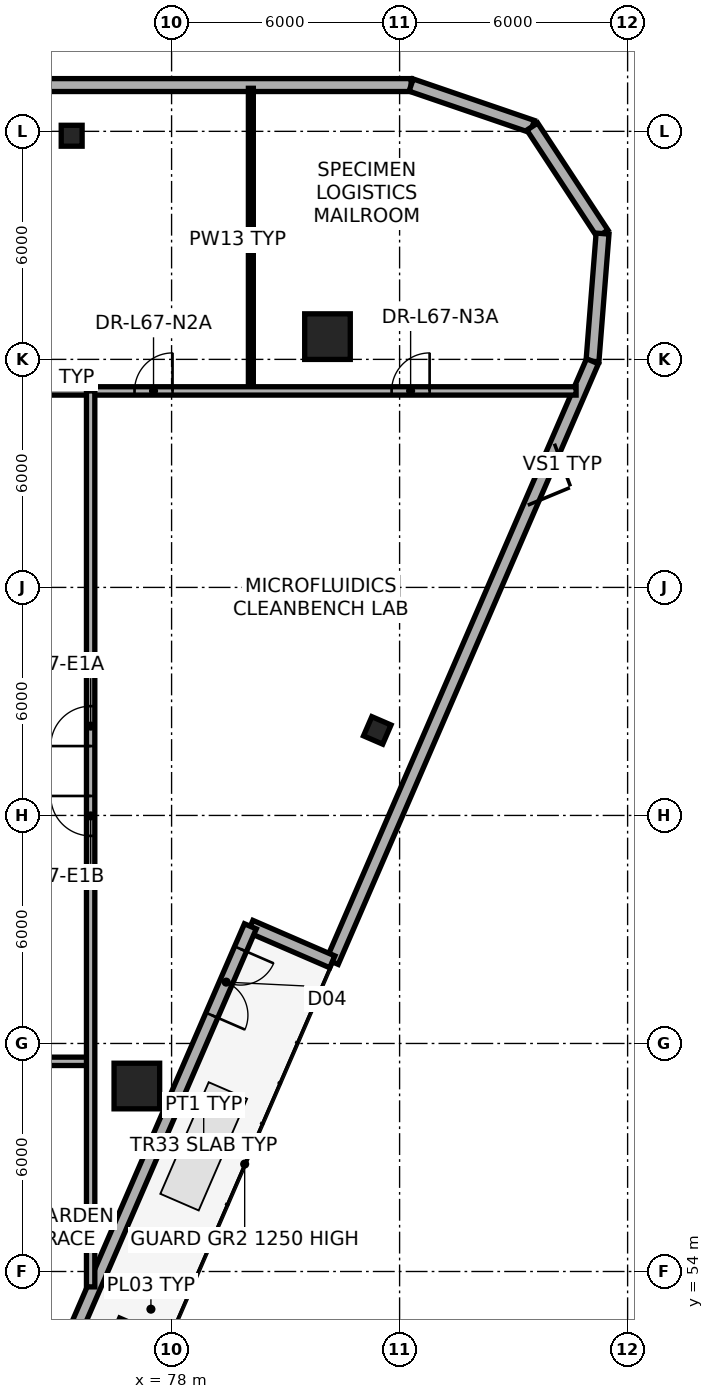
"""IFC4 building model, lengths in metres.
Left out: names, types, materials, properties, quantities, classifications, styles, units other than length and angle.
Written with IfcOpenShell. Run it as: python <this file> out.ifc"""

import sys

from ifc_helpers import new_model, si_unit, direction, frame, frame_2d, origin, origin_2d, place, context, subcontext, project, spatial, rectangle, extrude, element, fill, save


model = new_model("IFC4")
c1 = context("Model", 3, precision=1e-05, world=origin(), true_north=direction((0.0, 1.0)))
c2 = subcontext(c1, "Body", "Model", "MODEL_VIEW")
j1 = project(units=[si_unit("LENGTHUNIT", "METRE"), si_unit("PLANEANGLEUNIT", "RADIAN")], contexts=[c1])
p1 = place(None, origin())
s1 = spatial("IfcSite", under=j1, at=p1, CompositionType="ELEMENT")
p2 = place(p1, origin())
s2 = spatial("IfcBuilding", under=s1, at=p2, CompositionType="ELEMENT")
p3 = place(p2, frame((0.0, 0.0, 253.5)))
s3 = spatial("IfcBuildingStorey", under=s2, at=p3, CompositionType="ELEMENT", Elevation=253.5)
for number, where, z_axis, x_axis in (
    (1, (82.102, 78.599, 0.0), (0.0, 0.0, 1.0), (1.0, 0.0, 0.0)),
    (2, (77.086, 58.88, 0.0), (0.0, 0.0, 1.0), (1.0, 0.0, 0.0)),
):
    element("IfcColumn", number, at=place(p3, frame(where, z_axis=z_axis, x_axis=x_axis)), inside=s3, PredefinedType="COLUMN", context=c2, shape_type="SweptSolid", body=[
        extrude(rectangle(XDim=1.2, YDim=1.2, at=origin_2d()), origin(), (0.0, 0.0, 1.0), 3.65),
    ])
p4 = place(p3, frame((76.692, 52.314, 0.003), z_axis=(-0.019545044433, 0.038353802945, 0.999073058909), x_axis=(0.06214873527, -0.997284917644, 0.039500984089)))
e3 = element("IfcColumn", 3, at=p4, inside=s3, PredefinedType="PILASTER", context=c2, shape_type="SweptSolid", body=[
    extrude(rectangle(XDim=0.7, YDim=0.35, at=origin_2d()), origin(), (0.0, 0.0, 1.0), 3.647),
])
p5 = place(p3, frame((83.484, 68.248, 0.003), z_axis=(-0.039229508262, -0.005623342481, 0.999214403269), x_axis=(0.964025407479, -0.263310688432, 0.036366125617)))
e4 = element("IfcColumn", 4, at=p5, inside=s3, PredefinedType="COLUMN", context=c2, shape_type="SweptSolid", body=[
    extrude(rectangle(XDim=0.55, YDim=0.55, at=origin_2d()), origin(), (0.0, 0.0, 1.0), 3.647),
])
p6 = place(p3, frame((75.42, 83.946, 0.003), z_axis=(-0.026841076243, -0.033534611465, 0.999077067328), x_axis=(-0.780716755404, 0.624885067698, 0.0)))
e5 = element("IfcColumn", 5, at=p6, inside=s3, PredefinedType="COLUMN", context=c2, shape_type="SweptSolid", body=[
    extrude(rectangle(XDim=0.55, YDim=0.55, at=origin_2d()), origin(), (0.0, 0.0, 1.0), 3.647),
])
p7 = place(p3, frame((47.696, 85.218, 0.0), z_axis=(0.0, 0.0, 1.0), x_axis=(1.0, 0.0, 0.0)))
e6 = element("IfcWall", 6, at=p7, inside=s3, PredefinedType="STANDARD", context=c2, shape_type="SweptSolid", body=[
    extrude(rectangle(XDim=36.607, YDim=0.34, at=frame_2d((18.304, 0.0))), origin(), (0.0, 0.0, 1.0), 0.85),
])
p8 = place(p3, frame((84.304, 85.218, 0.0), z_axis=(0.0, 0.0, 1.0), x_axis=(0.946072263845, -0.323955662989, 0.0)))
e7 = element("IfcWall", 7, at=p8, inside=s3, PredefinedType="STANDARD", context=c2, shape_type="SweptSolid", body=[
    extrude(rectangle(XDim=3.369, YDim=0.34, at=frame_2d((1.685, 0.0))), origin(), (0.0, 0.0, 1.0), 3.4),
])
p9 = place(p3, frame((87.491, 84.126, 0.0), z_axis=(0.0, 0.0, 1.0), x_axis=(0.548851092281, -0.835920138831, 0.0)))
e8 = element("IfcWall", 8, at=p9, inside=s3, PredefinedType="STANDARD", context=c2, shape_type="SweptSolid", body=[
    extrude(rectangle(XDim=3.37, YDim=0.34, at=frame_2d((1.685, 0.0))), origin(), (0.0, 0.0, 1.0), 3.4),
])
p10 = place(p3, frame((89.341, 81.31, 0.0), z_axis=(0.0, 0.0, 1.0), x_axis=(-0.078835134627, -0.996887667467, 0.0)))
e9 = element("IfcWall", 9, at=p10, inside=s3, PredefinedType="STANDARD", context=c2, shape_type="SweptSolid", body=[
    extrude(rectangle(XDim=3.369, YDim=0.34, at=frame_2d((1.685, 0.0))), origin(), (0.0, 0.0, 1.0), 3.4),
])
p11 = place(p3, frame((89.075, 77.951, 0.0), z_axis=(0.0, 0.0, 1.0), x_axis=(-0.397531449249, -0.917588549873, 0.0)))
e10 = element("IfcWall", 10, at=p11, inside=s3, PredefinedType="STANDARD", context=c2, shape_type="SweptSolid", body=[
    extrude(rectangle(XDim=17.222, YDim=0.34, at=frame_2d((8.611, 0.0))), origin(), (0.0, 0.0, 1.0), 0.85),
])
p12 = place(p3, frame((82.229, 62.148, 0.0), z_axis=(0.0, 0.0, 1.0), x_axis=(-0.917563205573, 0.397589944263, 0.0)))
e11 = element("IfcWall", 11, at=p12, inside=s3, PredefinedType="STANDARD", context=c2, shape_type="SweptSolid", body=[
    extrude(rectangle(XDim=2.35, YDim=0.34, at=frame_2d((1.175, 0.0))), origin(), (0.0, 0.0, 1.0), 2.68),
])
p13 = place(p3, frame((80.073, 63.083, 0.0), z_axis=(0.0, 0.0, 1.0), x_axis=(-0.397528289892, -0.91758991861, 0.0)))
e12 = element("IfcWall", 12, at=p13, inside=s3, PredefinedType="STANDARD", context=c2, shape_type="SweptSolid", body=[
    extrude(rectangle(XDim=11.6, YDim=0.34, at=frame_2d((5.8, 0.0))), origin(), (0.0, 0.0, 1.0), 2.98),
])
p14 = place(p13, frame((0.65, 0.0, 0.0)))
e13 = element("IfcOpeningElement", 13, at=p14, cuts=e12, PredefinedType="OPENING", context=c2, shape_type="SweptSolid", body=[
    extrude(rectangle(XDim=1.9, YDim=2.3, at=frame_2d((0.95, 1.15))), frame((0.0, 0.18, 0.0), z_axis=(0.0, -1.0, 0.0), x_axis=(1.0, 0.0, 0.0)), (0.0, 0.0, 1.0), 0.36),
])
p15 = place(p3, frame((80.086, 77.17, 0.0), z_axis=(0.0, 0.0, 1.0), x_axis=(0.0, 1.0, 0.0)))
e14 = element("IfcWall", 14, at=p15, inside=s3, PredefinedType="PARTITIONING", context=c2, shape_type="SweptSolid", body=[
    extrude(rectangle(XDim=7.963, YDim=0.13, at=frame_2d((3.981, 0.0))), origin(), (0.0, 0.0, 1.0), 2.68),
])
p16 = place(p3, frame((57.55, 77.17, 0.0), z_axis=(0.0, 0.0, 1.0), x_axis=(1.0, 0.0, 0.0)))
e15 = element("IfcWall", 15, at=p16, inside=s3, PredefinedType="PARTITIONING", context=c2, shape_type="SweptSolid", body=[
    extrude(rectangle(XDim=31.094, YDim=0.22, at=frame_2d((15.547, 0.0))), origin(), (0.0, 0.0, 1.0), 2.68),
])
p17 = place(p16, frame((11.21, 0.0, 0.0)))
e16 = element("IfcOpeningElement", 16, at=p17, cuts=e15, PredefinedType="OPENING", context=c2, shape_type="SweptSolid", body=[
    extrude(rectangle(XDim=0.98, YDim=2.1, at=frame_2d((0.49, 1.05))), frame((0.0, 0.12, 0.0), z_axis=(0.0, -1.0, 0.0), x_axis=(1.0, 0.0, 0.0)), (0.0, 0.0, 1.0), 0.24),
])
p18 = place(p16, frame((14.035, 0.0, 0.0)))
e17 = element("IfcOpeningElement", 17, at=p18, cuts=e15, PredefinedType="OPENING", context=c2, shape_type="SweptSolid", body=[
    extrude(rectangle(XDim=0.98, YDim=2.1, at=frame_2d((0.49, 1.05))), frame((0.0, 0.12, 0.0), z_axis=(0.0, -1.0, 0.0), x_axis=(1.0, 0.0, 0.0)), (0.0, 0.0, 1.0), 0.24),
])
p19 = place(p16, frame((2.931, 0.0, 0.0)))
e18 = element("IfcOpeningElement", 18, at=p19, cuts=e15, PredefinedType="OPENING", context=c2, shape_type="SweptSolid", body=[
    extrude(rectangle(XDim=1.0, YDim=2.1, at=frame_2d((0.5, 1.05))), frame((0.0, 0.12, 0.0), z_axis=(0.0, -1.0, 0.0), x_axis=(1.0, 0.0, 0.0)), (0.0, 0.0, 1.0), 0.24),
])
p20 = place(p16, frame((19.475, 0.0, 0.0)))
e19 = element("IfcOpeningElement", 19, at=p20, cuts=e15, PredefinedType="OPENING", context=c2, shape_type="SweptSolid", body=[
    extrude(rectangle(XDim=1.0, YDim=2.1, at=frame_2d((0.5, 1.05))), frame((0.0, 0.12, 0.0), z_axis=(0.0, -1.0, 0.0), x_axis=(1.0, 0.0, 0.0)), (0.0, 0.0, 1.0), 0.24),
])
p21 = place(p16, frame((26.24, 0.0, 0.0)))
e20 = element("IfcOpeningElement", 20, at=p21, cuts=e15, PredefinedType="OPENING", context=c2, shape_type="SweptSolid", body=[
    extrude(rectangle(XDim=1.0, YDim=2.1, at=frame_2d((0.5, 1.05))), frame((0.0, 0.12, 0.0), z_axis=(0.0, -1.0, 0.0), x_axis=(1.0, 0.0, 0.0)), (0.0, 0.0, 1.0), 0.24),
])
p22 = place(p3, frame((50.998, 59.53, 0.0), z_axis=(0.0, 0.0, 1.0), x_axis=(1.0, 0.0, 0.0)))
e21 = element("IfcWall", 21, at=p22, inside=s3, PredefinedType="PARTITIONING", context=c2, shape_type="SweptSolid", body=[
    extrude(rectangle(XDim=24.872, YDim=0.22, at=frame_2d((12.436, 0.0))), origin(), (0.0, 0.0, 1.0), 2.68),
])
p23 = place(p22, frame((7.099, 0.0, 0.0)))
e22 = element("IfcOpeningElement", 22, at=p23, cuts=e21, PredefinedType="OPENING", context=c2, shape_type="SweptSolid", body=[
    extrude(rectangle(XDim=1.5, YDim=2.2, at=frame_2d((0.75, 1.1))), frame((0.0, 0.12, 0.0), z_axis=(0.0, -1.0, 0.0), x_axis=(1.0, 0.0, 0.0)), (0.0, 0.0, 1.0), 0.24),
])
p24 = place(p22, frame((17.844, 0.0, 0.0)))
e23 = element("IfcOpeningElement", 23, at=p24, cuts=e21, PredefinedType="OPENING", context=c2, shape_type="SweptSolid", body=[
    extrude(rectangle(XDim=1.5, YDim=2.2, at=frame_2d((0.75, 1.1))), frame((0.0, 0.12, 0.0), z_axis=(0.0, -1.0, 0.0), x_axis=(1.0, 0.0, 0.0)), (0.0, 0.0, 1.0), 0.24),
])
p25 = place(p3, frame((75.87, 53.595, 0.0), z_axis=(0.0, 0.0, 1.0), x_axis=(0.0, 1.0, 0.0)))
e24 = element("IfcWall", 24, at=p25, inside=s3, PredefinedType="PARTITIONING", context=c2, shape_type="SweptSolid", body=[
    extrude(rectangle(XDim=23.574, YDim=0.22, at=frame_2d((11.787, 0.0))), origin(), (0.0, 0.0, 1.0), 2.83),
])
p26 = place(p25, frame((14.23, 0.0, 0.0)))
e25 = element("IfcOpeningElement", 25, at=p26, cuts=e24, PredefinedType="OPENING", context=c2, shape_type="SweptSolid", body=[
    extrude(rectangle(XDim=1.05, YDim=2.15, at=frame_2d((0.525, 1.075))), frame((0.0, 0.12, 0.0), z_axis=(0.0, -1.0, 0.0), x_axis=(1.0, 0.0, 0.0)), (0.0, 0.0, 1.0), 0.24),
])
p27 = place(p25, frame((11.867, 0.0, 0.0)))
e26 = element("IfcOpeningElement", 26, at=p27, cuts=e24, PredefinedType="OPENING", context=c2, shape_type="SweptSolid", body=[
    extrude(rectangle(XDim=1.05, YDim=2.15, at=frame_2d((0.525, 1.075))), frame((0.0, 0.12, 0.0), z_axis=(0.0, -1.0, 0.0), x_axis=(1.0, 0.0, 0.0)), (0.0, 0.0, 1.0), 0.24),
])
p28 = place(p14, origin())
e27 = element("IfcDoor", 27, at=p28, inside=s3, OperationType="DOUBLE_DOOR_SINGLE_SWING", PredefinedType="DOOR", context=c2, shape_type="SweptSolid", body=[
    extrude(rectangle(XDim=1.9, YDim=2.3, at=frame_2d((0.95, 1.15))), frame((0.0, 0.025, 0.0), z_axis=(0.0, -1.0, 0.0), x_axis=(1.0, 0.0, 0.0)), (0.0, 0.0, 1.0), 0.05),
])
fill(e13, e27)
p29 = place(p20, origin())
e28 = element("IfcDoor", 28, at=p29, inside=s3, OperationType="SINGLE_SWING_RIGHT", PredefinedType="DOOR", context=c2, shape_type="SweptSolid", body=[
    extrude(rectangle(XDim=1.0, YDim=2.1, at=frame_2d((0.5, 1.05))), frame((0.0, 0.025, 0.0), z_axis=(0.0, -1.0, 0.0), x_axis=(1.0, 0.0, 0.0)), (0.0, 0.0, 1.0), 0.05),
])
fill(e19, e28)
p30 = place(p21, origin())
e29 = element("IfcDoor", 29, at=p30, inside=s3, OperationType="SINGLE_SWING_RIGHT", PredefinedType="DOOR", context=c2, shape_type="SweptSolid", body=[
    extrude(rectangle(XDim=1.0, YDim=2.1, at=frame_2d((0.5, 1.05))), frame((0.0, 0.025, 0.0), z_axis=(0.0, -1.0, 0.0), x_axis=(1.0, 0.0, 0.0)), (0.0, 0.0, 1.0), 0.05),
])
fill(e20, e29)
p31 = place(p26, origin())
e30 = element("IfcDoor", 30, at=p31, inside=s3, OperationType="SINGLE_SWING_LEFT", PredefinedType="DOOR", context=c2, shape_type="SweptSolid", body=[
    extrude(rectangle(XDim=1.05, YDim=2.15, at=frame_2d((0.525, 1.075))), frame((0.0, 0.025, 0.0), z_axis=(0.0, -1.0, 0.0), x_axis=(1.0, 0.0, 0.0)), (0.0, 0.0, 1.0), 0.05),
])
fill(e25, e30)
p32 = place(p27, origin())
e31 = element("IfcDoor", 31, at=p32, inside=s3, OperationType="SINGLE_SWING_RIGHT", PredefinedType="DOOR", context=c2, shape_type="SweptSolid", body=[
    extrude(rectangle(XDim=1.05, YDim=2.15, at=frame_2d((0.525, 1.075))), frame((0.0, 0.025, 0.0), z_axis=(0.0, -1.0, 0.0), x_axis=(1.0, 0.0, 0.0)), (0.0, 0.0, 1.0), 0.05),
])
fill(e26, e31)
save(model, sys.argv[1])
